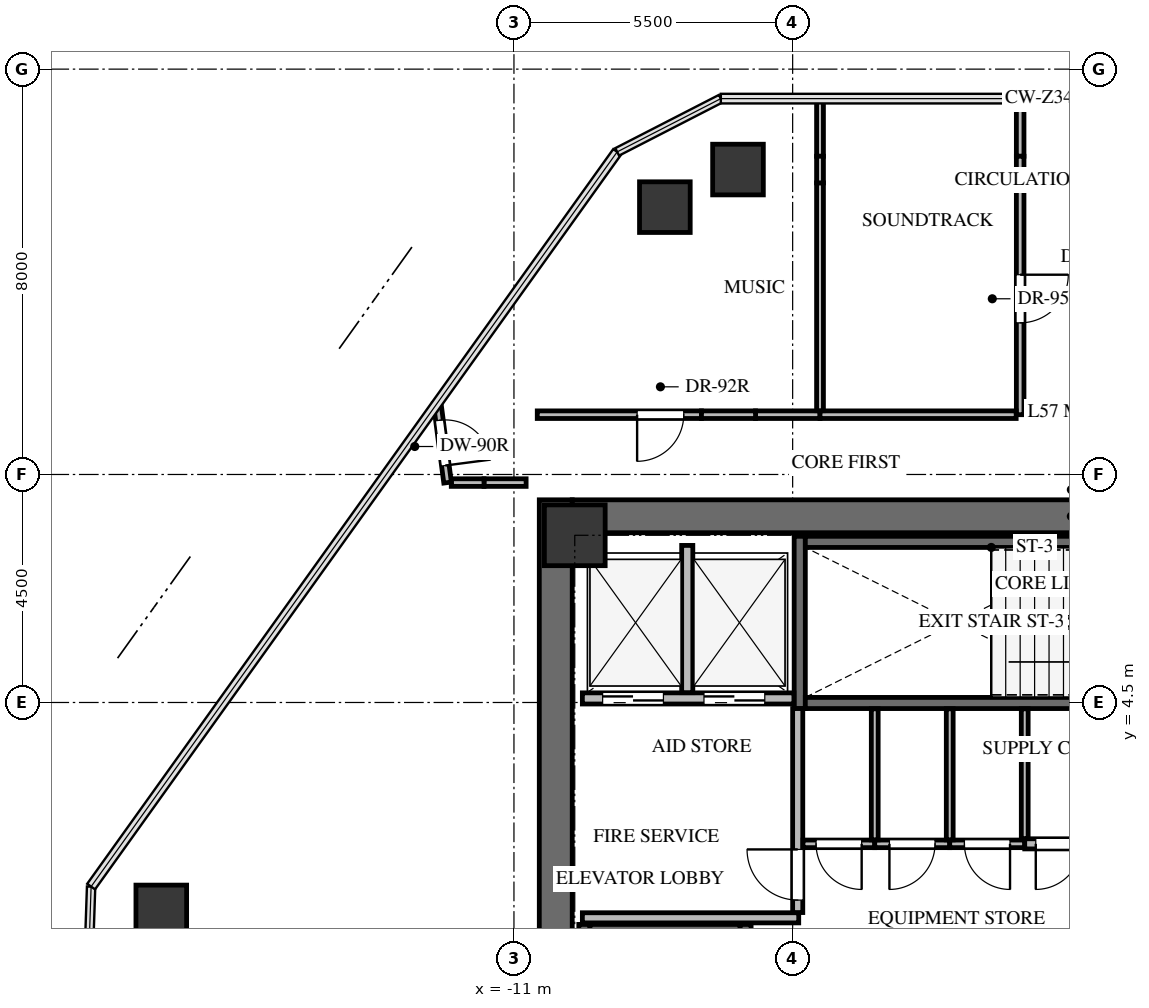
"""IFC4 building model, lengths in metres.
Left out: names, types, materials, properties, quantities, classifications, styles, units other than length and angle.
Written with IfcOpenShell. Run it as: python <this file> out.ifc"""

import sys

from ifc_helpers import new_model, si_unit, direction, frame, frame_2d, origin, origin_2d, place, context, subcontext, project, spatial, rectangle, extrude, source, transform, mapped, element, fill, save


model = new_model("IFC4")
c1 = context("Model", 3, precision=1e-05, world=origin(), true_north=direction((0.0, 1.0)))
c2 = subcontext(c1, "Body", "Model", "MODEL_VIEW")
j1 = project(units=[si_unit("LENGTHUNIT", "METRE"), si_unit("PLANEANGLEUNIT", "RADIAN")], contexts=[c1])
p1 = place(None, origin())
s1 = spatial("IfcSite", under=j1, at=p1, CompositionType="ELEMENT")
p2 = place(p1, origin())
s2 = spatial("IfcBuilding", under=s1, at=p2, CompositionType="ELEMENT")
p3 = place(p2, frame((0.0, 0.0, 206.2)))
s3 = spatial("IfcBuildingStorey", under=s2, at=p3, CompositionType="ELEMENT", Elevation=206.2)
p4 = place(p3, frame((-10.175, -8.5, 0.0), z_axis=(0.0, 0.0, 1.0), x_axis=(0.0, 1.0, 0.0)))
e1 = element("IfcWall", 1, at=p4, inside=s3, PredefinedType="SHEAR", context=c2, shape_type="SweptSolid", body=[
    extrude(rectangle(XDim=17.0, YDim=0.65, at=frame_2d((8.5, 0.0))), origin(), (0.0, 0.0, 1.0), 3.0),
])
p5 = place(p3, frame((-9.85, 8.175, 0.0), z_axis=(0.0, 0.0, 1.0), x_axis=(1.0, 0.0, 0.0)))
e2 = element("IfcWall", 2, at=p5, inside=s3, PredefinedType="SHEAR", context=c2, shape_type="SweptSolid", body=[
    extrude(rectangle(XDim=19.7, YDim=0.65, at=frame_2d((9.85, 0.0))), origin(), (0.0, 0.0, 1.0), 3.0),
])
p6 = place(p3, frame((-6.43, -7.77, -0.24), z_axis=(0.0, 0.0, 1.0), x_axis=(0.0, 1.0, 0.0)))
e3 = element("IfcWall", 3, at=p6, inside=s3, PredefinedType="SHEAR", context=c2, shape_type="SweptSolid", body=[
    extrude(rectangle(XDim=7.89, YDim=0.22, at=frame_2d((3.945, 0.0))), origin(), (0.0, 0.0, 1.0), 3.0),
])
p7 = place(p6, frame((6.32, 0.0, 0.0)))
e4 = element("IfcOpeningElement", 4, at=p7, cuts=e3, PredefinedType="OPENING", context=c2, shape_type="SweptSolid", body=[
    extrude(rectangle(XDim=1.05, YDim=2.15, at=frame_2d((0.525, 1.075))), frame((0.0, 0.12, 0.0), z_axis=(0.0, -1.0, 0.0), x_axis=(1.0, 0.0, 0.0)), (0.0, 0.0, 1.0), 0.24),
])
p8 = place(p3, frame((-9.61, 0.12, -0.24), z_axis=(0.0, 0.0, 1.0), x_axis=(0.0, -1.0, 0.0)))
e5 = element("IfcWall", 5, at=p8, inside=s3, PredefinedType="SHEAR", context=c2, shape_type="SweptSolid", body=[
    extrude(rectangle(XDim=7.89, YDim=0.22, at=frame_2d((3.945, 0.0))), origin(), (0.0, 0.0, 1.0), 3.0),
])
p9 = place(p3, frame((-6.54, 0.01, -0.24), z_axis=(0.0, 0.0, 1.0), x_axis=(-1.0, 0.0, 0.0)))
e6 = element("IfcWall", 6, at=p9, inside=s3, PredefinedType="SHEAR", context=c2, shape_type="SweptSolid", body=[
    extrude(rectangle(XDim=2.96, YDim=0.22, at=frame_2d((1.48, 0.0))), origin(), (0.0, 0.0, 1.0), 3.0),
])
p10 = place(p3, frame((-5.36, 7.78, -0.24), z_axis=(0.0, 0.0, 1.0), x_axis=(0.0, -1.0, 0.0)))
e7 = element("IfcWall", 7, at=p10, inside=s3, PredefinedType="SHEAR", context=c2, shape_type="SweptSolid", body=[
    extrude(rectangle(XDim=3.4, YDim=0.22, at=frame_2d((1.7, 0.0))), origin(), (0.0, 0.0, 1.0), 3.0),
])
p11 = place(p3, frame((-5.25, 4.49, -0.24), z_axis=(0.0, 0.0, 1.0), x_axis=(1.0, 0.0, 0.0)))
e8 = element("IfcWall", 8, at=p11, inside=s3, PredefinedType="SHEAR", context=c2, shape_type="SweptSolid", body=[
    extrude(rectangle(XDim=7.35, YDim=0.22, at=frame_2d((3.675, 0.0))), origin(), (0.0, 0.0, 1.0), 3.0),
])
p12 = place(p11, frame((5.85, 0.0, 0.0)))
e9 = element("IfcOpeningElement", 9, at=p12, cuts=e8, PredefinedType="OPENING", context=c2, shape_type="SweptSolid", body=[
    extrude(rectangle(XDim=1.05, YDim=2.15, at=frame_2d((0.525, 1.075))), frame((0.0, 0.12, 0.0), z_axis=(0.0, -1.0, 0.0), x_axis=(1.0, 0.0, 0.0)), (0.0, 0.0, 1.0), 0.24),
])
p13 = place(p3, frame((2.1, 7.67, -0.24), z_axis=(0.0, 0.0, 1.0), x_axis=(-1.0, 0.0, 0.0)))
e10 = element("IfcWall", 10, at=p13, inside=s3, PredefinedType="SHEAR", context=c2, shape_type="SweptSolid", body=[
    extrude(rectangle(XDim=7.35, YDim=0.22, at=frame_2d((3.675, 0.0))), origin(), (0.0, 0.0, 1.0), 3.0),
])
m1 = source(origin(), c2, "Body", "SweptSolid", [
    extrude(rectangle(XDim=1.2, YDim=1.2, at=origin_2d()), origin(), (0.0, 0.0, 1.0), 3.0),
])
p14 = place(p3, frame((-9.8, 7.8, -0.24), z_axis=(0.0, 0.0, 1.0), x_axis=(1.0, 0.0, 0.0)))
e11 = element("IfcColumn", 11, at=p14, inside=s3, PredefinedType="COLUMN", context=c2, shape_type="MappedRepresentation", body=[
    mapped(m1, transform((0.0, 0.0, 0.0), x_axis=(1.0, 0.0, 0.0), y_axis=(0.0, 1.0, 0.0), z_axis=(0.0, 0.0, 1.0), scale=1.0)),
])
m2 = source(origin(), c2, "Body", "SweptSolid", [
    extrude(rectangle(XDim=1.0, YDim=1.0, at=origin_2d()), origin(), (0.0, 0.0, 1.0), 3.0),
])
for number, where, z_axis, x_axis in (
    (12, (-17.96, 0.396, -0.24), (0.0, 0.0, 1.0), (1.0, 0.0, 0.0)),
    (13, (-8.022, 14.276, -0.24), (0.0, 0.0, 1.0), (1.0, 0.0, 0.0)),
    (14, (-6.579, 15.018, -0.24), (0.0, 0.0, 1.0), (1.0, 0.0, 0.0)),
):
    element("IfcColumn", number, at=place(p3, frame(where, z_axis=z_axis, x_axis=x_axis)), inside=s3, PredefinedType="COLUMN", context=c2, shape_type="MappedRepresentation", body=[
        mapped(m2, transform((0.0, 0.0, 0.0), x_axis=(1.0, 0.0, 0.0), y_axis=(0.0, 1.0, 0.0), z_axis=(0.0, 0.0, 1.0), scale=1.0)),
    ])
p15 = place(p3, frame((-9.65, 4.58, 0.0), z_axis=(0.0, 0.0, 1.0), x_axis=(1.0, 0.0, 0.0)))
e15 = element("IfcWall", 15, at=p15, inside=s3, PredefinedType="SOLIDWALL", context=c2, shape_type="SweptSolid", body=[
    extrude(rectangle(XDim=4.175, YDim=0.22, at=frame_2d((2.087, 0.0))), origin(), (0.0, 0.0, 1.0), 2.745),
])
p16 = place(p15, frame((0.4, 0.0, 0.0)))
e16 = element("IfcOpeningElement", 16, at=p16, cuts=e15, PredefinedType="OPENING", context=c2, shape_type="SweptSolid", body=[
    extrude(rectangle(XDim=1.2, YDim=2.15, at=frame_2d((0.6, 1.075))), frame((0.0, 0.12, 0.0), z_axis=(0.0, -1.0, 0.0), x_axis=(1.0, 0.0, 0.0)), (0.0, 0.0, 1.0), 0.24),
])
p17 = place(p15, frame((2.4, 0.0, 0.0)))
e17 = element("IfcOpeningElement", 17, at=p17, cuts=e15, PredefinedType="OPENING", context=c2, shape_type="SweptSolid", body=[
    extrude(rectangle(XDim=1.2, YDim=2.15, at=frame_2d((0.6, 1.075))), frame((0.0, 0.12, 0.0), z_axis=(0.0, -1.0, 0.0), x_axis=(1.0, 0.0, 0.0)), (0.0, 0.0, 1.0), 0.24),
])
p18 = place(p3, frame((-7.58, 4.694, 0.0), z_axis=(0.0, 0.0, 1.0), x_axis=(0.0, 1.0, 0.0)))
e18 = element("IfcWall", 18, at=p18, inside=s3, PredefinedType="SOLIDWALL", context=c2, shape_type="SweptSolid", body=[
    extrude(rectangle(XDim=2.906, YDim=0.22, at=frame_2d((1.453, 0.0))), origin(), (0.0, 0.0, 1.0), 2.745),
])
p19 = place(p3, frame((-9.65, 0.25, 0.0), z_axis=(0.0, 0.0, 1.0), x_axis=(1.0, 0.0, 0.0)))
e19 = element("IfcWall", 19, at=p19, inside=s3, PredefinedType="SOLIDWALL", context=c2, shape_type="SweptSolid", body=[
    extrude(rectangle(XDim=4.27, YDim=0.2, at=frame_2d((2.135, 0.0))), origin(), (0.0, 0.0, 1.0), 2.745),
])
p20 = place(p3, frame((-5.4, 0.354, 0.0), z_axis=(0.0, 0.0, 1.0), x_axis=(0.0, 1.0, 0.0)))
e20 = element("IfcWall", 20, at=p20, inside=s3, PredefinedType="SOLIDWALL", context=c2, shape_type="SweptSolid", body=[
    extrude(rectangle(XDim=4.026, YDim=0.2, at=frame_2d((2.013, 0.0))), origin(), (0.0, 0.0, 1.0), 2.745),
])
p21 = place(p20, frame((0.246, 0.0, 0.0)))
e21 = element("IfcOpeningElement", 21, at=p21, cuts=e20, PredefinedType="OPENING", context=c2, shape_type="SweptSolid", body=[
    extrude(rectangle(XDim=1.0, YDim=2.15, at=frame_2d((0.5, 1.075))), frame((0.0, 0.11, 0.0), z_axis=(0.0, -1.0, 0.0), x_axis=(1.0, 0.0, 0.0)), (0.0, 0.0, 1.0), 0.22),
])
p22 = place(p3, frame((-3.88, 1.71, 0.0), z_axis=(0.0, 0.0, 1.0), x_axis=(-1.0, 0.0, 0.0)))
e22 = element("IfcWall", 22, at=p22, inside=s3, PredefinedType="PARTITIONING", context=c2, shape_type="SweptSolid", body=[
    extrude(rectangle(XDim=1.416, YDim=0.15, at=frame_2d((0.708, 0.0))), origin(), (0.0, 0.0, 1.0), 2.745),
])
p23 = place(p22, frame((0.258, 0.0, 0.0)))
e23 = element("IfcOpeningElement", 23, at=p23, cuts=e22, PredefinedType="OPENING", context=c2, shape_type="SweptSolid", body=[
    extrude(rectangle(XDim=0.9, YDim=2.05, at=frame_2d((0.45, 1.025))), frame((0.0, 0.085, 0.0), z_axis=(0.0, -1.0, 0.0), x_axis=(1.0, 0.0, 0.0)), (0.0, 0.0, 1.0), 0.17),
])
p24 = place(p3, frame((-2.4, 1.71, 0.0), z_axis=(0.0, 0.0, 1.0), x_axis=(-1.0, 0.0, 0.0)))
e24 = element("IfcWall", 24, at=p24, inside=s3, PredefinedType="PARTITIONING", context=c2, shape_type="SweptSolid", body=[
    extrude(rectangle(XDim=1.48, YDim=0.15, at=frame_2d((0.74, 0.0))), origin(), (0.0, 0.0, 1.0), 2.745),
])
p25 = place(p24, frame((0.29, 0.0, 0.0)))
e25 = element("IfcOpeningElement", 25, at=p25, cuts=e24, PredefinedType="OPENING", context=c2, shape_type="SweptSolid", body=[
    extrude(rectangle(XDim=0.9, YDim=2.05, at=frame_2d((0.45, 1.025))), frame((0.0, 0.085, 0.0), z_axis=(0.0, -1.0, 0.0), x_axis=(1.0, 0.0, 0.0)), (0.0, 0.0, 1.0), 0.17),
])
p26 = place(p3, frame((-0.92, 1.71, 0.0), z_axis=(0.0, 0.0, 1.0), x_axis=(-1.0, 0.0, 0.0)))
e26 = element("IfcWall", 26, at=p26, inside=s3, PredefinedType="PARTITIONING", context=c2, shape_type="SweptSolid", body=[
    extrude(rectangle(XDim=1.48, YDim=0.15, at=frame_2d((0.74, 0.0))), origin(), (0.0, 0.0, 1.0), 2.745),
])
p27 = place(p26, frame((0.29, 0.0, 0.0)))
e27 = element("IfcOpeningElement", 27, at=p27, cuts=e26, PredefinedType="OPENING", context=c2, shape_type="SweptSolid", body=[
    extrude(rectangle(XDim=0.9, YDim=2.05, at=frame_2d((0.45, 1.025))), frame((0.0, 0.085, 0.0), z_axis=(0.0, -1.0, 0.0), x_axis=(1.0, 0.0, 0.0)), (0.0, 0.0, 1.0), 0.17),
])
p28 = place(p3, frame((0.416, 1.71, 0.0), z_axis=(0.0, 0.0, 1.0), x_axis=(-1.0, 0.0, 0.0)))
e28 = element("IfcWall", 28, at=p28, inside=s3, PredefinedType="SOLIDWALL", context=c2, shape_type="SweptSolid", body=[
    extrude(rectangle(XDim=1.336, YDim=0.2, at=frame_2d((0.668, 0.0))), origin(), (0.0, 0.0, 1.0), 2.745),
])
p29 = place(p28, frame((0.218, 0.0, 0.0)))
e29 = element("IfcOpeningElement", 29, at=p29, cuts=e28, PredefinedType="OPENING", context=c2, shape_type="SweptSolid", body=[
    extrude(rectangle(XDim=0.9, YDim=2.05, at=frame_2d((0.45, 1.025))), frame((0.0, 0.11, 0.0), z_axis=(0.0, -1.0, 0.0), x_axis=(1.0, 0.0, 0.0)), (0.0, 0.0, 1.0), 0.22),
])
p30 = place(p3, frame((-4.96, 10.18, 0.0), z_axis=(0.0, 0.0, 1.0), x_axis=(-1.0, 0.0, 0.0)))
e30 = element("IfcWall", 30, at=p30, inside=s3, PredefinedType="PARTITIONING", context=c2, shape_type="SweptSolid", body=[
    extrude(rectangle(XDim=1.273, YDim=0.15, at=frame_2d((0.636, 0.0))), origin(), (0.0, 0.0, 1.0), 2.308),
])
p31 = place(p3, frame((-7.299, 10.18, 0.0), z_axis=(0.0, 0.0, 1.0), x_axis=(-1.0, 0.0, 0.0)))
e31 = element("IfcWall", 31, at=p31, inside=s3, PredefinedType="PARTITIONING", context=c2, shape_type="SweptSolid", body=[
    extrude(rectangle(XDim=3.241, YDim=0.15, at=frame_2d((1.62, 0.0))), origin(), (0.0, 0.0, 1.0), 2.745),
])
p32 = place(p31, frame((0.35, 0.0, 0.0)))
e32 = element("IfcOpeningElement", 32, at=p32, cuts=e31, PredefinedType="OPENING", context=c2, shape_type="SweptSolid", body=[
    extrude(rectangle(XDim=0.92, YDim=2.1, at=frame_2d((0.46, 1.05))), frame((0.0, 0.085, 0.0), z_axis=(0.0, -1.0, 0.0), x_axis=(1.0, 0.0, 0.0)), (0.0, 0.0, 1.0), 0.17),
])
p33 = place(p3, frame((-6.233, 10.18, 0.0), z_axis=(0.0, 0.0, 1.0), x_axis=(-1.0, 0.0, 0.0)))
e33 = element("IfcWall", 33, at=p33, inside=s3, PredefinedType="PARTITIONING", context=c2, shape_type="SweptSolid", body=[
    extrude(rectangle(XDim=1.067, YDim=0.15, at=frame_2d((0.533, 0.0))), origin(), (0.0, 0.0, 1.0), 1.942),
])
p34 = place(p3, frame((-1.01, 16.418, 0.0), z_axis=(0.0, 0.0, 1.0), x_axis=(0.0, -1.0, 0.0)))
e34 = element("IfcWall", 34, at=p34, inside=s3, PredefinedType="PARTITIONING", context=c2, shape_type="SweptSolid", body=[
    extrude(rectangle(XDim=1.137, YDim=0.15, at=frame_2d((0.569, 0.0))), origin(), (0.0, 0.0, 1.0), 2.745),
])
p35 = place(p3, frame((-1.01, 14.755, 0.0), z_axis=(0.0, 0.0, 1.0), x_axis=(0.0, -1.0, 0.0)))
e35 = element("IfcWall", 35, at=p35, inside=s3, PredefinedType="PARTITIONING", context=c2, shape_type="SweptSolid", body=[
    extrude(rectangle(XDim=4.575, YDim=0.15, at=frame_2d((2.288, 0.0))), origin(), (0.0, 0.0, 1.0), 2.745),
])
p36 = place(p35, frame((1.813, 0.0, 0.0)))
e36 = element("IfcOpeningElement", 36, at=p36, cuts=e35, PredefinedType="OPENING", context=c2, shape_type="SweptSolid", body=[
    extrude(rectangle(XDim=0.95, YDim=2.1, at=frame_2d((0.475, 1.05))), frame((0.0, 0.085, 0.0), z_axis=(0.0, -1.0, 0.0), x_axis=(1.0, 0.0, 0.0)), (0.0, 0.0, 1.0), 0.17),
])
p37 = place(p3, frame((-1.01, 15.281, 0.0), z_axis=(0.0, 0.0, 1.0), x_axis=(0.0, -1.0, 0.0)))
e37 = element("IfcWall", 37, at=p37, inside=s3, PredefinedType="PARTITIONING", context=c2, shape_type="SweptSolid", body=[
    extrude(rectangle(XDim=0.525, YDim=0.15, at=frame_2d((0.263, 0.0))), origin(), (0.0, 0.0, 1.0), 2.099),
])
p38 = place(p3, frame((-1.089, 10.18, 0.0), z_axis=(0.0, 0.0, 1.0), x_axis=(-1.0, 0.0, 0.0)))
e38 = element("IfcWall", 38, at=p38, inside=s3, PredefinedType="PARTITIONING", context=c2, shape_type="SweptSolid", body=[
    extrude(rectangle(XDim=3.871, YDim=0.15, at=frame_2d((1.936, 0.0))), origin(), (0.0, 0.0, 1.0), 2.745),
])
p39 = place(p3, frame((-11.591, 8.84, 0.0), z_axis=(0.0, 0.0, 1.0), x_axis=(1.0, 0.0, 0.0)))
e39 = element("IfcWall", 39, at=p39, inside=s3, PredefinedType="PARTITIONING", context=c2, shape_type="SweptSolid", body=[
    extrude(rectangle(XDim=0.831, YDim=0.15, at=frame_2d((0.416, 0.0))), origin(), (0.0, 0.0, 1.0), 2.745),
])
p40 = place(p3, frame((-12.237, 8.84, 0.0), z_axis=(0.0, 0.0, 1.0), x_axis=(1.0, 0.0, 0.0)))
e40 = element("IfcWall", 40, at=p40, inside=s3, PredefinedType="PARTITIONING", context=c2, shape_type="SweptSolid", body=[
    extrude(rectangle(XDim=0.646, YDim=0.15, at=frame_2d((0.323, 0.0))), origin(), (0.0, 0.0, 1.0), 2.099),
])
p41 = place(p3, frame((-12.514, 10.406, 0.0), z_axis=(0.0, 0.0, 1.0), x_axis=(0.129378833178, -0.991595238757, 0.0)))
e41 = element("IfcWall", 41, at=p41, inside=s3, PredefinedType="PARTITIONING", context=c2, shape_type="SweptSolid", body=[
    extrude(rectangle(XDim=1.579, YDim=0.15, at=frame_2d((0.79, 0.0))), origin(), (0.0, 0.0, 1.0), 2.745),
])
p42 = place(p41, frame((0.34, 0.0, 0.0)))
e42 = element("IfcOpeningElement", 42, at=p42, cuts=e41, PredefinedType="OPENING", context=c2, shape_type="SweptSolid", body=[
    extrude(rectangle(XDim=0.9, YDim=2.05, at=frame_2d((0.45, 1.025))), frame((0.0, 0.085, 0.0), z_axis=(0.0, -1.0, 0.0), x_axis=(1.0, 0.0, 0.0)), (0.0, 0.0, 1.0), 0.17),
])
for number, where, z_axis, x_axis in (
    (43, (-3.88, 4.375, 0.0), (0.0, 0.0, 1.0), (0.0, -1.0, 0.0)),
    (44, (-2.4, 4.375, 0.0), (0.0, 0.0, 1.0), (0.0, -1.0, 0.0)),
):
    element("IfcWall", number, at=place(p3, frame(where, z_axis=z_axis, x_axis=x_axis)), inside=s3, PredefinedType="PARTITIONING", context=c2, shape_type="SweptSolid", body=[
        extrude(rectangle(XDim=2.586, YDim=0.135, at=frame_2d((1.293, 0.0))), origin(), (0.0, 0.0, 1.0), 2.745),
    ])
p43 = place(p3, frame((-0.92, 4.375, 0.0), z_axis=(0.0, 0.0, 1.0), x_axis=(0.0, -1.0, 0.0)))
e45 = element("IfcWall", 45, at=p43, inside=s3, PredefinedType="PARTITIONING", context=c2, shape_type="SweptSolid", body=[
    extrude(rectangle(XDim=2.561, YDim=0.135, at=frame_2d((1.281, 0.0))), origin(), (0.0, 0.0, 1.0), 2.745),
])
p44 = place(p3, frame((-4.96, 16.418, 0.0), z_axis=(0.0, 0.0, 1.0), x_axis=(0.0, -1.0, 0.0)))
e46 = element("IfcWall", 46, at=p44, inside=s3, PredefinedType="PARTITIONING", context=c2, shape_type="SweptSolid", body=[
    extrude(rectangle(XDim=1.137, YDim=0.135, at=frame_2d((0.569, 0.0))), origin(), (0.0, 0.0, 1.0), 2.745),
])
p45 = place(p3, frame((-4.96, 14.755, 0.0), z_axis=(0.0, 0.0, 1.0), x_axis=(0.0, -1.0, 0.0)))
e47 = element("IfcWall", 47, at=p45, inside=s3, PredefinedType="PARTITIONING", context=c2, shape_type="SweptSolid", body=[
    extrude(rectangle(XDim=4.496, YDim=0.135, at=frame_2d((2.248, 0.0))), origin(), (0.0, 0.0, 1.0), 2.745),
])
p46 = place(p3, frame((-4.96, 15.281, 0.0), z_axis=(0.0, 0.0, 1.0), x_axis=(0.0, -1.0, 0.0)))
e48 = element("IfcWall", 48, at=p46, inside=s3, PredefinedType="PARTITIONING", context=c2, shape_type="SweptSolid", body=[
    extrude(rectangle(XDim=0.525, YDim=0.135, at=frame_2d((0.263, 0.0))), origin(), (0.0, 0.0, 1.0), 2.099),
])
m3 = source(origin(), c2, "Body", "SweptSolid", [
    extrude(rectangle(XDim=1.2, YDim=2.15, at=frame_2d((0.6, 1.075))), frame((0.0, 0.025, 0.0), z_axis=(0.0, -1.0, 0.0), x_axis=(1.0, 0.0, 0.0)), (0.0, 0.0, 1.0), 0.05),
])
p47 = place(p16, origin())
e49 = element("IfcDoor", 49, at=p47, inside=s3, OperationType="DOUBLE_DOOR_SLIDING", PredefinedType="DOOR", context=c2, shape_type="MappedRepresentation", body=[
    mapped(m3, transform((0.0, 0.0, 0.0), x_axis=(1.0, 0.0, 0.0), y_axis=(0.0, 1.0, 0.0), z_axis=(0.0, 0.0, 1.0), scale=1.0)),
])
fill(e16, e49)
p48 = place(p17, origin())
e50 = element("IfcDoor", 50, at=p48, inside=s3, OperationType="DOUBLE_DOOR_SLIDING", PredefinedType="DOOR", context=c2, shape_type="MappedRepresentation", body=[
    mapped(m3, transform((0.0, 0.0, 0.0), x_axis=(1.0, 0.0, 0.0), y_axis=(0.0, 1.0, 0.0), z_axis=(0.0, 0.0, 1.0), scale=1.0)),
])
fill(e17, e50)
m4 = source(origin(), c2, "Body", "SweptSolid", [
    extrude(rectangle(XDim=1.0, YDim=2.15, at=frame_2d((0.5, 1.075))), frame((0.0, 0.025, 0.0), z_axis=(0.0, -1.0, 0.0), x_axis=(1.0, 0.0, 0.0)), (0.0, 0.0, 1.0), 0.05),
])
p49 = place(p21, origin())
e51 = element("IfcDoor", 51, at=p49, inside=s3, OperationType="SINGLE_SWING_RIGHT", PredefinedType="DOOR", context=c2, shape_type="MappedRepresentation", body=[
    mapped(m4, transform((0.0, 0.0, 0.0), x_axis=(1.0, 0.0, 0.0), y_axis=(0.0, 1.0, 0.0), z_axis=(0.0, 0.0, 1.0), scale=1.0)),
])
fill(e21, e51)
m5 = source(origin(), c2, "Body", "SweptSolid", [
    extrude(rectangle(XDim=0.9, YDim=2.05, at=frame_2d((0.45, 1.025))), frame((0.0, 0.025, 0.0), z_axis=(0.0, -1.0, 0.0), x_axis=(1.0, 0.0, 0.0)), (0.0, 0.0, 1.0), 0.05),
])
p50 = place(p23, origin())
e52 = element("IfcDoor", 52, at=p50, inside=s3, OperationType="SINGLE_SWING_LEFT", PredefinedType="DOOR", context=c2, shape_type="MappedRepresentation", body=[
    mapped(m5, transform((0.0, 0.0, 0.0), x_axis=(1.0, 0.0, 0.0), y_axis=(0.0, 1.0, 0.0), z_axis=(0.0, 0.0, 1.0), scale=1.0)),
])
fill(e23, e52)
m6 = source(origin(), c2, "Body", "SweptSolid", [
    extrude(rectangle(XDim=0.9, YDim=2.05, at=frame_2d((0.45, 1.025))), frame((0.0, 0.025, 0.0), z_axis=(0.0, -1.0, 0.0), x_axis=(1.0, 0.0, 0.0)), (0.0, 0.0, 1.0), 0.05),
])
p51 = place(p25, origin())
e53 = element("IfcDoor", 53, at=p51, inside=s3, OperationType="SINGLE_SWING_RIGHT", PredefinedType="DOOR", context=c2, shape_type="MappedRepresentation", body=[
    mapped(m6, transform((0.0, 0.0, 0.0), x_axis=(1.0, 0.0, 0.0), y_axis=(0.0, 1.0, 0.0), z_axis=(0.0, 0.0, 1.0), scale=1.0)),
])
fill(e25, e53)
p52 = place(p27, origin())
e54 = element("IfcDoor", 54, at=p52, inside=s3, OperationType="SINGLE_SWING_LEFT", PredefinedType="DOOR", context=c2, shape_type="MappedRepresentation", body=[
    mapped(m5, transform((0.0, 0.0, 0.0), x_axis=(1.0, 0.0, 0.0), y_axis=(0.0, 1.0, 0.0), z_axis=(0.0, 0.0, 1.0), scale=1.0)),
])
fill(e27, e54)
p53 = place(p29, origin())
e55 = element("IfcDoor", 55, at=p53, inside=s3, OperationType="SINGLE_SWING_RIGHT", PredefinedType="DOOR", context=c2, shape_type="MappedRepresentation", body=[
    mapped(m6, transform((0.0, 0.0, 0.0), x_axis=(1.0, 0.0, 0.0), y_axis=(0.0, 1.0, 0.0), z_axis=(0.0, 0.0, 1.0), scale=1.0)),
])
fill(e29, e55)
m7 = source(origin(), c2, "Body", "SweptSolid", [
    extrude(rectangle(XDim=0.92, YDim=2.1, at=frame_2d((0.46, 1.05))), frame((0.0, 0.025, 0.0), z_axis=(0.0, -1.0, 0.0), x_axis=(1.0, 0.0, 0.0)), (0.0, 0.0, 1.0), 0.05),
])
p54 = place(p32, origin())
e56 = element("IfcDoor", 56, at=p54, inside=s3, OperationType="SINGLE_SWING_RIGHT", PredefinedType="DOOR", context=c2, shape_type="MappedRepresentation", body=[
    mapped(m7, transform((0.0, 0.0, 0.0), x_axis=(1.0, 0.0, 0.0), y_axis=(0.0, 1.0, 0.0), z_axis=(0.0, 0.0, 1.0), scale=1.0)),
])
fill(e32, e56)
m8 = source(origin(), c2, "Body", "SweptSolid", [
    extrude(rectangle(XDim=0.95, YDim=2.1, at=frame_2d((0.475, 1.05))), frame((0.0, 0.025, 0.0), z_axis=(0.0, -1.0, 0.0), x_axis=(1.0, 0.0, 0.0)), (0.0, 0.0, 1.0), 0.05),
])
p55 = place(p36, origin())
e57 = element("IfcDoor", 57, at=p55, inside=s3, OperationType="SINGLE_SWING_LEFT", PredefinedType="DOOR", context=c2, shape_type="MappedRepresentation", body=[
    mapped(m8, transform((0.0, 0.0, 0.0), x_axis=(1.0, 0.0, 0.0), y_axis=(0.0, 1.0, 0.0), z_axis=(0.0, 0.0, 1.0), scale=1.0)),
])
fill(e36, e57)
m9 = source(origin(), c2, "Body", "SweptSolid", [
    extrude(rectangle(XDim=0.9, YDim=2.05, at=frame_2d((0.45, 1.025))), frame((0.0, 0.025, 0.0), z_axis=(0.0, -1.0, 0.0), x_axis=(1.0, 0.0, 0.0)), (0.0, 0.0, 1.0), 0.05),
])
p56 = place(p42, origin())
e58 = element("IfcDoor", 58, at=p56, inside=s3, OperationType="SINGLE_SWING_RIGHT", PredefinedType="DOOR", context=c2, shape_type="MappedRepresentation", body=[
    mapped(m9, transform((0.0, 0.0, 0.0), x_axis=(1.0, 0.0, 0.0), y_axis=(0.0, 1.0, 0.0), z_axis=(0.0, 0.0, 1.0), scale=1.0)),
])
fill(e42, e58)
save(model, sys.argv[1])
